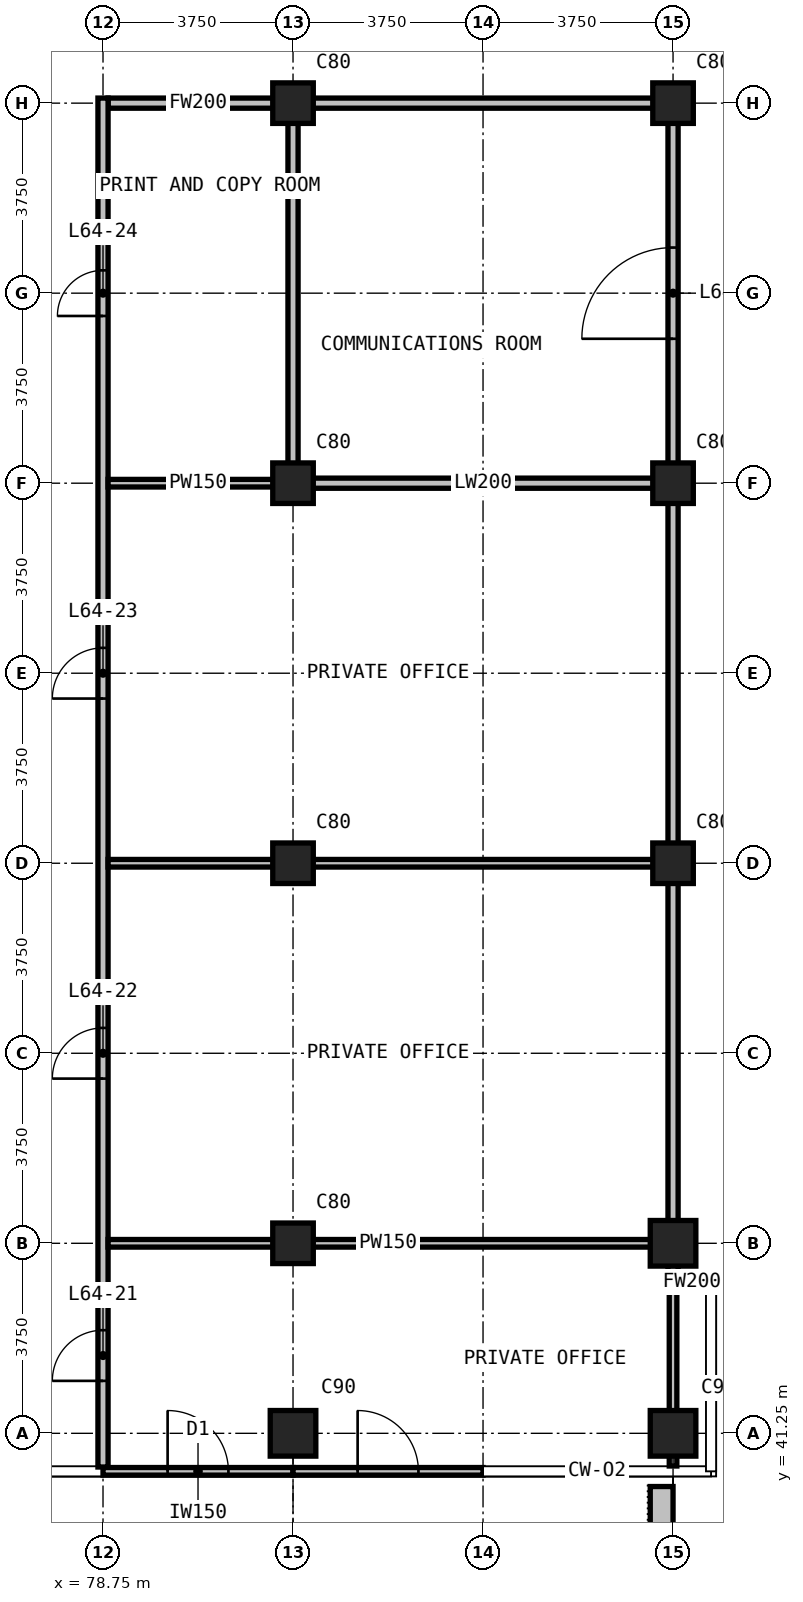
"""IFC4 building model, lengths in metres.
Left out: names, types, materials, properties, quantities, classifications, styles, units other than length and angle.
Written with IfcOpenShell. Run it as: python <this file> out.ifc"""

import sys

from ifc_helpers import new_model, si_unit, direction, frame, frame_2d, origin, origin_2d, place, context, subcontext, project, spatial, rectangle, extrude, element, fill, save


model = new_model("IFC4")
c1 = context("Model", 3, precision=1e-05, world=origin(), true_north=direction((0.0, 1.0)))
c2 = subcontext(c1, "Body", "Model", "MODEL_VIEW")
j1 = project(units=[si_unit("LENGTHUNIT", "METRE"), si_unit("PLANEANGLEUNIT", "RADIAN")], contexts=[c1])
p1 = place(None, origin())
s1 = spatial("IfcSite", under=j1, at=p1, CompositionType="ELEMENT")
p2 = place(p1, origin())
s2 = spatial("IfcBuilding", under=s1, at=p2, CompositionType="ELEMENT")
p3 = place(p2, frame((0.0, 0.0, 246.3)))
s3 = spatial("IfcBuildingStorey", under=s2, at=p3, CompositionType="ELEMENT", Elevation=246.3)
p4 = place(p3, frame((82.5, 41.25, 0.0), z_axis=(0.0, 0.0, 1.0), x_axis=(1.0, 0.0, 0.0)))
e1 = element("IfcColumn", 1, at=p4, inside=s3, PredefinedType="COLUMN", context=c2, shape_type="SweptSolid", body=[
    extrude(rectangle(XDim=0.9, YDim=0.9, at=origin_2d()), origin(), (0.0, 0.0, 1.0), 3.6),
])
for number, where, z_axis, x_axis in (
    (2, (82.5, 45.0, 0.0), (0.0, 0.0, 1.0), (1.0, 0.0, 0.0)),
    (3, (82.5, 52.5, 0.0), (0.0, 0.0, 1.0), (1.0, 0.0, 0.0)),
    (4, (82.5, 60.0, 0.0), (0.0, 0.0, 1.0), (1.0, 0.0, 0.0)),
    (5, (82.5, 67.5, 0.0), (0.0, 0.0, 1.0), (1.0, 0.0, 0.0)),
):
    element("IfcColumn", number, at=place(p3, frame(where, z_axis=z_axis, x_axis=x_axis)), inside=s3, PredefinedType="COLUMN", context=c2, shape_type="SweptSolid", body=[
        extrude(rectangle(XDim=0.8, YDim=0.8, at=origin_2d()), origin(), (0.0, 0.0, 1.0), 3.6),
    ])
for number, where, z_axis, x_axis in (
    (6, (90.0, 41.25, 0.0), (0.0, 0.0, 1.0), (1.0, 0.0, 0.0)),
    (7, (90.0, 45.0, 0.0), (0.0, 0.0, 1.0), (1.0, 0.0, 0.0)),
):
    element("IfcColumn", number, at=place(p3, frame(where, z_axis=z_axis, x_axis=x_axis)), inside=s3, PredefinedType="COLUMN", context=c2, shape_type="SweptSolid", body=[
        extrude(rectangle(XDim=0.9, YDim=0.9, at=origin_2d()), origin(), (0.0, 0.0, 1.0), 3.6),
    ])
for number, where, z_axis, x_axis in (
    (8, (90.0, 52.5, 0.0), (0.0, 0.0, 1.0), (1.0, 0.0, 0.0)),
    (9, (90.0, 60.0, 0.0), (0.0, 0.0, 1.0), (1.0, 0.0, 0.0)),
    (10, (90.0, 67.5, 0.0), (0.0, 0.0, 1.0), (1.0, 0.0, 0.0)),
):
    element("IfcColumn", number, at=place(p3, frame(where, z_axis=z_axis, x_axis=x_axis)), inside=s3, PredefinedType="COLUMN", context=c2, shape_type="SweptSolid", body=[
        extrude(rectangle(XDim=0.8, YDim=0.8, at=origin_2d()), origin(), (0.0, 0.0, 1.0), 3.6),
    ])
p5 = place(p3, frame((78.75, 40.5, 0.0), z_axis=(0.0, 0.0, 1.0), x_axis=(1.0, 0.0, 0.0)))
e11 = element("IfcWall", 11, at=p5, inside=s3, PredefinedType="SOLIDWALL", context=c2, shape_type="SweptSolid", body=[
    extrude(rectangle(XDim=3.75, YDim=0.15, at=frame_2d((1.875, 0.0))), origin(), (0.0, 0.0, 1.0), 3.3),
])
p6 = place(p5, frame((1.275, 0.0, 0.0)))
e12 = element("IfcOpeningElement", 12, at=p6, cuts=e11, PredefinedType="OPENING", context=c2, shape_type="SweptSolid", body=[
    extrude(rectangle(XDim=1.2, YDim=2.4, at=frame_2d((0.6, 1.2))), frame((0.0, 0.085, 0.0), z_axis=(0.0, -1.0, 0.0), x_axis=(1.0, 0.0, 0.0)), (0.0, 0.0, 1.0), 0.17),
])
p7 = place(p3, frame((82.5, 40.5, 0.0), z_axis=(0.0, 0.0, 1.0), x_axis=(1.0, 0.0, 0.0)))
e13 = element("IfcWall", 13, at=p7, inside=s3, PredefinedType="SOLIDWALL", context=c2, shape_type="SweptSolid", body=[
    extrude(rectangle(XDim=3.75, YDim=0.15, at=frame_2d((1.875, 0.0))), origin(), (0.0, 0.0, 1.0), 3.3),
])
p8 = place(p7, frame((1.275, 0.0, 0.0)))
e14 = element("IfcOpeningElement", 14, at=p8, cuts=e13, PredefinedType="OPENING", context=c2, shape_type="SweptSolid", body=[
    extrude(rectangle(XDim=1.2, YDim=2.4, at=frame_2d((0.6, 1.2))), frame((0.0, 0.085, 0.0), z_axis=(0.0, -1.0, 0.0), x_axis=(1.0, 0.0, 0.0)), (0.0, 0.0, 1.0), 0.17),
])
p9 = place(p3, frame((89.775, 40.2, 0.0), z_axis=(0.0, 0.0, 1.0), x_axis=(0.0, -1.0, 0.0)))
e15 = element("IfcWall", 15, at=p9, inside=s3, PredefinedType="USERDEFINED", context=c2, shape_type="SweptSolid", body=[
    extrude(rectangle(XDim=2.35, YDim=0.45, at=frame_2d((1.175, 0.0))), origin(), (0.0, 0.0, 1.0), 1.1),
])
for number, where, z_axis, x_axis in (
    (16, (82.6, 60.0, 0.0), (0.0, 0.0, 1.0), (1.0, 0.0, 0.0)),
    (17, (82.6, 67.5, 0.0), (0.0, 0.0, 1.0), (1.0, 0.0, 0.0)),
):
    element("IfcWall", number, at=place(p3, frame(where, z_axis=z_axis, x_axis=x_axis)), inside=s3, PredefinedType="PARTITIONING", context=c2, shape_type="SweptSolid", body=[
        extrude(rectangle(XDim=7.3, YDim=0.2, at=frame_2d((3.65, 0.0))), origin(), (0.0, 0.0, 1.0), 3.3),
    ])
p10 = place(p3, frame((82.5, 59.9, 0.0), z_axis=(0.0, 0.0, 1.0), x_axis=(0.0, 1.0, 0.0)))
e18 = element("IfcWall", 18, at=p10, inside=s3, PredefinedType="PARTITIONING", context=c2, shape_type="SweptSolid", body=[
    extrude(rectangle(XDim=7.7, YDim=0.2, at=frame_2d((3.85, 0.0))), origin(), (0.0, 0.0, 1.0), 3.3),
])
p11 = place(p3, frame((90.0, 59.9, 0.0), z_axis=(0.0, 0.0, 1.0), x_axis=(0.0, 1.0, 0.0)))
e19 = element("IfcWall", 19, at=p11, inside=s3, PredefinedType="PARTITIONING", context=c2, shape_type="SweptSolid", body=[
    extrude(rectangle(XDim=7.7, YDim=0.2, at=frame_2d((3.85, 0.0))), origin(), (0.0, 0.0, 1.0), 3.3),
])
p12 = place(p11, frame((2.95, 0.0, 0.0)))
e20 = element("IfcOpeningElement", 20, at=p12, cuts=e19, PredefinedType="OPENING", context=c2, shape_type="SweptSolid", body=[
    extrude(rectangle(XDim=1.8, YDim=2.4, at=frame_2d((0.9, 1.2))), frame((0.0, 0.11, 0.0), z_axis=(0.0, -1.0, 0.0), x_axis=(1.0, 0.0, 0.0)), (0.0, 0.0, 1.0), 0.22),
])
p13 = place(p3, frame((90.1, 44.235, 0.0), z_axis=(0.0, 0.0, 1.0), x_axis=(1.0, 0.0, 0.0)))
e21 = element("IfcWall", 21, at=p13, inside=s3, PredefinedType="PARTITIONING", context=c2, shape_type="SweptSolid", body=[
    extrude(rectangle(XDim=0.545, YDim=0.2, at=frame_2d((0.272, 0.0))), origin(), (0.0, 0.0, 1.0), 3.3),
])
p14 = place(p3, frame((78.85, 67.5, 0.0), z_axis=(0.0, 0.0, 1.0), x_axis=(1.0, 0.0, 0.0)))
e22 = element("IfcWall", 22, at=p14, inside=s3, PredefinedType="PARTITIONING", context=c2, shape_type="SweptSolid", body=[
    extrude(rectangle(XDim=3.55, YDim=0.2, at=frame_2d((1.775, 0.0))), origin(), (0.0, 0.0, 1.0), 3.3),
])
p15 = place(p3, frame((78.75, 40.585, 0.0), z_axis=(0.0, 0.0, 1.0), x_axis=(0.0, 1.0, 0.0)))
e23 = element("IfcWall", 23, at=p15, inside=s3, PredefinedType="PARTITIONING", context=c2, shape_type="SweptSolid", body=[
    extrude(rectangle(XDim=27.015, YDim=0.2, at=frame_2d((13.508, 0.0))), origin(), (0.0, 0.0, 1.0), 3.3),
])
p16 = place(p15, frame((1.7, 0.0, 0.0)))
e24 = element("IfcOpeningElement", 24, at=p16, cuts=e23, PredefinedType="OPENING", context=c2, shape_type="SweptSolid", body=[
    extrude(rectangle(XDim=1.0, YDim=2.2, at=frame_2d((0.5, 1.1))), frame((0.0, 0.11, 0.0), z_axis=(0.0, -1.0, 0.0), x_axis=(1.0, 0.0, 0.0)), (0.0, 0.0, 1.0), 0.22),
])
p17 = place(p15, frame((7.665, 0.0, 0.0)))
e25 = element("IfcOpeningElement", 25, at=p17, cuts=e23, PredefinedType="OPENING", context=c2, shape_type="SweptSolid", body=[
    extrude(rectangle(XDim=1.0, YDim=2.2, at=frame_2d((0.5, 1.1))), frame((0.0, 0.11, 0.0), z_axis=(0.0, -1.0, 0.0), x_axis=(1.0, 0.0, 0.0)), (0.0, 0.0, 1.0), 0.22),
])
p18 = place(p15, frame((15.165, 0.0, 0.0)))
e26 = element("IfcOpeningElement", 26, at=p18, cuts=e23, PredefinedType="OPENING", context=c2, shape_type="SweptSolid", body=[
    extrude(rectangle(XDim=1.0, YDim=2.2, at=frame_2d((0.5, 1.1))), frame((0.0, 0.11, 0.0), z_axis=(0.0, -1.0, 0.0), x_axis=(1.0, 0.0, 0.0)), (0.0, 0.0, 1.0), 0.22),
])
p19 = place(p15, frame((22.715, 0.0, 0.0)))
e27 = element("IfcOpeningElement", 27, at=p19, cuts=e23, PredefinedType="OPENING", context=c2, shape_type="SweptSolid", body=[
    extrude(rectangle(XDim=0.9, YDim=2.2, at=frame_2d((0.45, 1.1))), frame((0.0, 0.11, 0.0), z_axis=(0.0, -1.0, 0.0), x_axis=(1.0, 0.0, 0.0)), (0.0, 0.0, 1.0), 0.22),
])
p20 = place(p3, frame((90.0, 44.135, 0.0), z_axis=(0.0, 0.0, 1.0), x_axis=(0.0, 1.0, 0.0)))
e28 = element("IfcWall", 28, at=p20, inside=s3, PredefinedType="PARTITIONING", context=c2, shape_type="SweptSolid", body=[
    extrude(rectangle(XDim=15.865, YDim=0.2, at=frame_2d((7.933, 0.0))), origin(), (0.0, 0.0, 1.0), 3.3),
])
for number, where, z_axis, x_axis in (
    (29, (78.85, 45.0, 0.0), (0.0, 0.0, 1.0), (1.0, 0.0, 0.0)),
    (30, (78.85, 52.5, 0.0), (0.0, 0.0, 1.0), (1.0, 0.0, 0.0)),
):
    element("IfcWall", number, at=place(p3, frame(where, z_axis=z_axis, x_axis=x_axis)), inside=s3, PredefinedType="PARTITIONING", context=c2, shape_type="SweptSolid", body=[
        extrude(rectangle(XDim=11.05, YDim=0.15, at=frame_2d((5.525, 0.0))), origin(), (0.0, 0.0, 1.0), 3.3),
    ])
p21 = place(p3, frame((78.85, 60.0, 0.0), z_axis=(0.0, 0.0, 1.0), x_axis=(1.0, 0.0, 0.0)))
e31 = element("IfcWall", 31, at=p21, inside=s3, PredefinedType="PARTITIONING", context=c2, shape_type="SweptSolid", body=[
    extrude(rectangle(XDim=3.55, YDim=0.15, at=frame_2d((1.775, 0.0))), origin(), (0.0, 0.0, 1.0), 3.3),
])
p22 = place(p3, frame((90.0, 40.605, 0.0), z_axis=(0.0, 0.0, 1.0), x_axis=(0.0, 1.0, 0.0)))
e32 = element("IfcWall", 32, at=p22, inside=s3, PredefinedType="PARTITIONING", context=c2, shape_type="SweptSolid", body=[
    extrude(rectangle(XDim=3.6, YDim=0.15, at=frame_2d((1.8, 0.0))), origin(), (0.0, 0.0, 1.0), 3.3),
])
p23 = place(p6, origin())
e33 = element("IfcDoor", 33, at=p23, inside=s3, OperationType="SINGLE_SWING_LEFT", PredefinedType="DOOR", context=c2, shape_type="SweptSolid", body=[
    extrude(rectangle(XDim=1.2, YDim=2.4, at=frame_2d((0.6, 1.2))), frame((0.0, 0.025, 0.0), z_axis=(0.0, -1.0, 0.0), x_axis=(1.0, 0.0, 0.0)), (0.0, 0.0, 1.0), 0.05),
])
fill(e12, e33)
p24 = place(p8, origin())
e34 = element("IfcDoor", 34, at=p24, inside=s3, OperationType="SINGLE_SWING_LEFT", PredefinedType="DOOR", context=c2, shape_type="SweptSolid", body=[
    extrude(rectangle(XDim=1.2, YDim=2.4, at=frame_2d((0.6, 1.2))), frame((0.0, 0.025, 0.0), z_axis=(0.0, -1.0, 0.0), x_axis=(1.0, 0.0, 0.0)), (0.0, 0.0, 1.0), 0.05),
])
fill(e14, e34)
p25 = place(p16, origin())
e35 = element("IfcDoor", 35, at=p25, inside=s3, OperationType="SINGLE_SWING_RIGHT", PredefinedType="DOOR", context=c2, shape_type="SweptSolid", body=[
    extrude(rectangle(XDim=1.0, YDim=2.2, at=frame_2d((0.5, 1.1))), frame((0.0, 0.025, 0.0), z_axis=(0.0, -1.0, 0.0), x_axis=(1.0, 0.0, 0.0)), (0.0, 0.0, 1.0), 0.05),
])
fill(e24, e35)
p26 = place(p17, origin())
e36 = element("IfcDoor", 36, at=p26, inside=s3, OperationType="SINGLE_SWING_LEFT", PredefinedType="DOOR", context=c2, shape_type="SweptSolid", body=[
    extrude(rectangle(XDim=1.0, YDim=2.2, at=frame_2d((0.5, 1.1))), frame((0.0, 0.025, 0.0), z_axis=(0.0, -1.0, 0.0), x_axis=(1.0, 0.0, 0.0)), (0.0, 0.0, 1.0), 0.05),
])
fill(e25, e36)
p27 = place(p18, origin())
e37 = element("IfcDoor", 37, at=p27, inside=s3, OperationType="SINGLE_SWING_LEFT", PredefinedType="DOOR", context=c2, shape_type="SweptSolid", body=[
    extrude(rectangle(XDim=1.0, YDim=2.2, at=frame_2d((0.5, 1.1))), frame((0.0, 0.025, 0.0), z_axis=(0.0, -1.0, 0.0), x_axis=(1.0, 0.0, 0.0)), (0.0, 0.0, 1.0), 0.05),
])
fill(e26, e37)
p28 = place(p19, origin())
e38 = element("IfcDoor", 38, at=p28, inside=s3, OperationType="SINGLE_SWING_RIGHT", PredefinedType="DOOR", context=c2, shape_type="SweptSolid", body=[
    extrude(rectangle(XDim=0.9, YDim=2.2, at=frame_2d((0.45, 1.1))), frame((0.0, 0.025, 0.0), z_axis=(0.0, -1.0, 0.0), x_axis=(1.0, 0.0, 0.0)), (0.0, 0.0, 1.0), 0.05),
])
fill(e27, e38)
p29 = place(p12, origin())
e39 = element("IfcDoor", 39, at=p29, inside=s3, OperationType="DOUBLE_DOOR_SINGLE_SWING", PredefinedType="DOOR", context=c2, shape_type="SweptSolid", body=[
    extrude(rectangle(XDim=1.8, YDim=2.4, at=frame_2d((0.9, 1.2))), frame((0.0, 0.025, 0.0), z_axis=(0.0, -1.0, 0.0), x_axis=(1.0, 0.0, 0.0)), (0.0, 0.0, 1.0), 0.05),
])
fill(e20, e39)
save(model, sys.argv[1])
